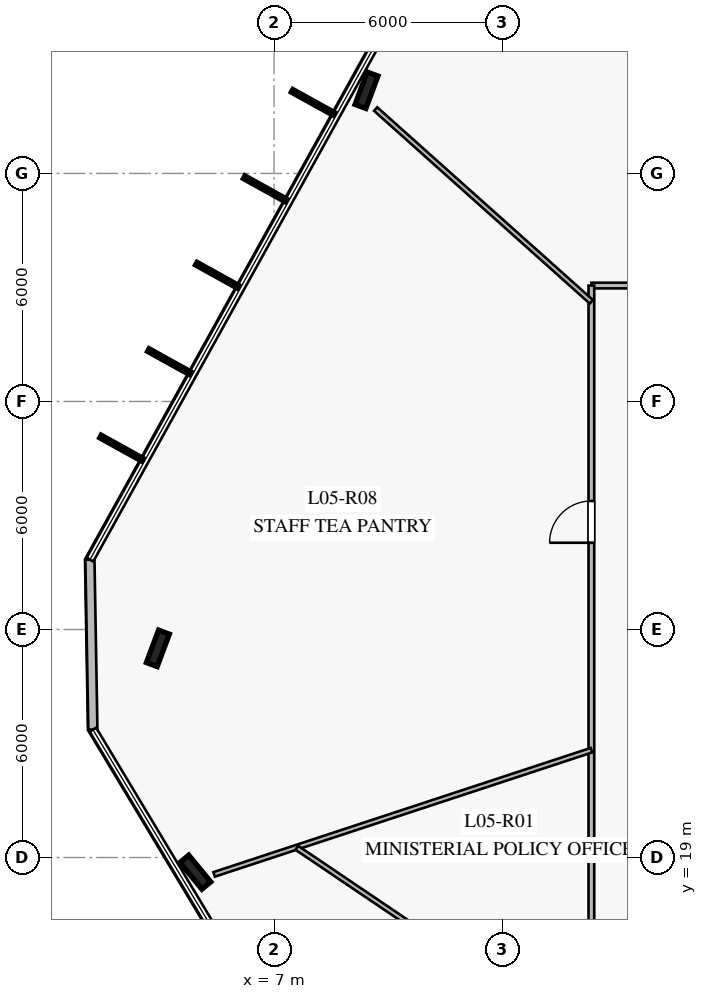
"""IFC4 building model, lengths in metres.
Left out: names, types, materials, properties, quantities, classifications, styles, units other than length and angle.
Written with IfcOpenShell. Run it as: python <this file> out.ifc"""

import sys

from ifc_helpers import new_model, si_unit, direction, frame, frame_2d, origin, origin_2d, place, context, subcontext, project, spatial, rectangle, i_section, extrude, element, fill, save


model = new_model("IFC4")
c1 = context("Model", 3, precision=1e-05, world=origin(), true_north=direction((0.0, 1.0)))
c2 = subcontext(c1, "Body", "Model", "MODEL_VIEW")
j1 = project(units=[si_unit("LENGTHUNIT", "METRE"), si_unit("PLANEANGLEUNIT", "RADIAN")], contexts=[c1])
p1 = place(None, origin())
s1 = spatial("IfcSite", under=j1, at=p1, CompositionType="ELEMENT")
p2 = place(p1, origin())
s2 = spatial("IfcBuilding", under=s1, at=p2, CompositionType="ELEMENT")
p3 = place(p2, frame((0.0, 0.0, 24.0)))
s3 = spatial("IfcBuildingStorey", under=s2, at=p3, CompositionType="ELEMENT", Elevation=24.0)
for number, where, z_axis, x_axis in (
    (1, (9.433, 39.189, -0.24), (0.0, 0.0, 1.0), (0.35, 0.937, 0.0)),
    (2, (3.943, 24.504, -0.24), (0.0, 0.0, 1.0), (0.35, 0.937, 0.0)),
    (3, (4.928, 18.614, -0.24), (0.0, 0.0, 1.0), (-0.636, 0.772, 0.0)),
):
    element("IfcColumn", number, at=place(p3, frame(where, z_axis=z_axis, x_axis=x_axis)), inside=s3, PredefinedType="COLUMN", context=c2, shape_type="SweptSolid", body=[
        extrude(i_section(OverallWidth=0.302, OverallDepth=0.91, WebThickness=0.021, FlangeThickness=0.04, at=origin_2d()), origin(), (0.0, 0.0, 1.0), 4.24),
    ])
p4 = place(p3, frame((2.155, 26.838, 0.0), z_axis=(0.0, 0.0, 1.0), x_axis=(0.017194596879, -0.999852161991, 0.0)))
e4 = element("IfcWall", 4, at=p4, inside=s3, PredefinedType="STANDARD", context=c2, shape_type="SweptSolid", body=[
    extrude(rectangle(XDim=4.473, YDim=0.24, at=frame_2d((2.236, 0.0))), origin(), (0.0, 0.0, 1.0), 3.76),
])
p5 = place(p3, frame((15.35, 34.05, 0.0), z_axis=(0.0, 0.0, 1.0), x_axis=(1.0, 0.0, 0.0)))
e5 = element("IfcWall", 5, at=p5, inside=s3, PredefinedType="PARTITIONING", context=c2, shape_type="SweptSolid", body=[
    extrude(rectangle(XDim=19.3, YDim=0.15, at=frame_2d((9.65, 0.0))), origin(), (0.0, 0.0, 1.0), 3.21),
])
p6 = place(p5, frame((14.693, 0.0, 0.0)))
e6 = element("IfcOpeningElement", 6, at=p6, cuts=e5, PredefinedType="OPENING", context=c2, shape_type="SweptSolid", body=[
    extrude(rectangle(XDim=1.1, YDim=2.2, at=frame_2d((0.55, 1.1))), frame((0.0, 0.085, 0.0), z_axis=(0.0, -1.0, 0.0), x_axis=(1.0, 0.0, 0.0)), (0.0, 0.0, 1.0), 0.17),
])
p7 = place(p5, frame((5.319, 0.0, 0.0)))
e7 = element("IfcOpeningElement", 7, at=p7, cuts=e5, PredefinedType="OPENING", context=c2, shape_type="SweptSolid", body=[
    extrude(rectangle(XDim=1.1, YDim=2.2, at=frame_2d((0.55, 1.1))), frame((0.0, 0.085, 0.0), z_axis=(0.0, -1.0, 0.0), x_axis=(1.0, 0.0, 0.0)), (0.0, 0.0, 1.0), 0.17),
])
p8 = place(p3, frame((15.35, 15.95, 0.0), z_axis=(0.0, 0.0, 1.0), x_axis=(0.0, 1.0, 0.0)))
e8 = element("IfcWall", 8, at=p8, inside=s3, PredefinedType="PARTITIONING", context=c2, shape_type="SweptSolid", body=[
    extrude(rectangle(XDim=18.1, YDim=0.15, at=frame_2d((9.05, 0.0))), origin(), (0.0, 0.0, 1.0), 3.21),
])
p9 = place(p8, frame((11.332, 0.0, 0.0)))
e9 = element("IfcOpeningElement", 9, at=p9, cuts=e8, PredefinedType="OPENING", context=c2, shape_type="SweptSolid", body=[
    extrude(rectangle(XDim=1.1, YDim=2.2, at=frame_2d((0.55, 1.1))), frame((0.0, 0.085, 0.0), z_axis=(0.0, -1.0, 0.0), x_axis=(1.0, 0.0, 0.0)), (0.0, 0.0, 1.0), 0.17),
])
p10 = place(p3, frame((15.35, 33.622, 0.0), z_axis=(0.0, 0.0, 1.0), x_axis=(-0.745724240471, 0.666254723941, 0.0)))
e10 = element("IfcWall", 10, at=p10, inside=s3, PredefinedType="PARTITIONING", context=c2, shape_type="SweptSolid", body=[
    extrude(rectangle(XDim=7.613, YDim=0.125, at=frame_2d((3.806, 0.0))), origin(), (0.0, 0.0, 1.0), 3.05),
])
p11 = place(p3, frame((15.35, 21.824, 0.0), z_axis=(0.0, 0.0, 1.0), x_axis=(-0.949851770283, -0.312700518851, 0.0)))
e11 = element("IfcWall", 11, at=p11, inside=s3, PredefinedType="PARTITIONING", context=c2, shape_type="SweptSolid", body=[
    extrude(rectangle(XDim=10.451, YDim=0.125, at=frame_2d((5.226, 0.0))), origin(), (0.0, 0.0, 1.0), 3.21),
])
p12 = place(p3, frame((7.599, 19.256, 0.0), z_axis=(0.0, 0.0, 1.0), x_axis=(0.828641341799, -0.559779891262, 0.0)))
e12 = element("IfcWall", 12, at=p12, inside=s3, PredefinedType="PARTITIONING", context=c2, shape_type="SweptSolid", body=[
    extrude(rectangle(XDim=17.123, YDim=0.125, at=frame_2d((8.562, 0.0))), origin(), (0.0, 0.0, 1.0), 3.21),
])
p13 = place(p12, frame((8.062, 0.0, 0.0)))
e13 = element("IfcOpeningElement", 13, at=p13, cuts=e12, PredefinedType="OPENING", context=c2, shape_type="SweptSolid", body=[
    extrude(rectangle(XDim=1.0, YDim=2.15, at=frame_2d((0.5, 1.075))), frame((0.0, 0.073, 0.0), z_axis=(0.0, -1.0, 0.0), x_axis=(1.0, 0.0, 0.0)), (0.0, 0.0, 1.0), 0.145),
])
p14 = place(p9, origin())
e14 = element("IfcDoor", 14, at=p14, inside=s3, OperationType="SINGLE_SWING_LEFT", PredefinedType="DOOR", context=c2, shape_type="SweptSolid", body=[
    extrude(rectangle(XDim=1.1, YDim=2.2, at=frame_2d((0.55, 1.1))), frame((0.0, 0.025, 0.0), z_axis=(0.0, -1.0, 0.0), x_axis=(1.0, 0.0, 0.0)), (0.0, 0.0, 1.0), 0.05),
])
fill(e9, e14)
save(model, sys.argv[1])
